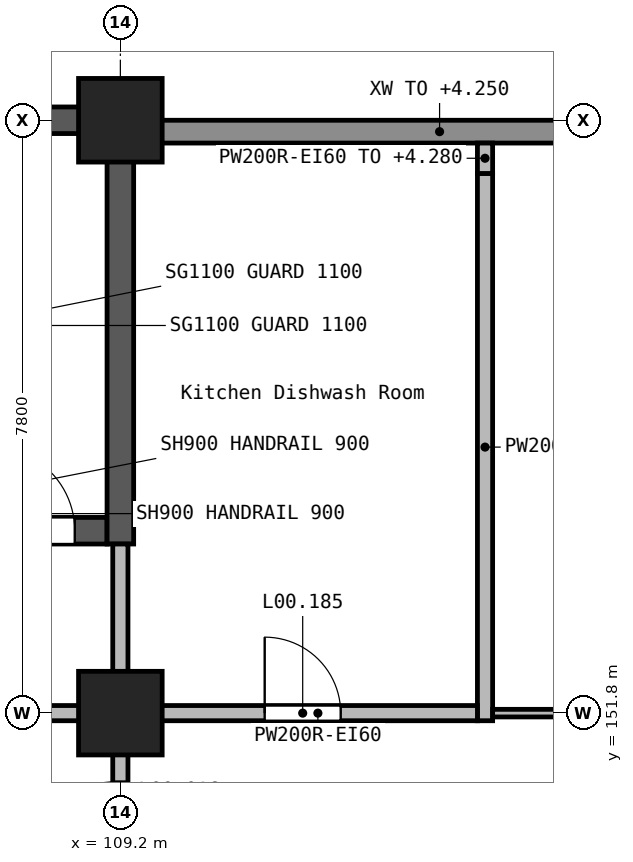
"""IFC4 building model, lengths in metres.
Left out: names, types, materials, properties, quantities, classifications, styles, units other than length and angle.
Written with IfcOpenShell. Run it as: python <this file> out.ifc"""

import sys

from ifc_helpers import new_model, si_unit, direction, frame, frame_2d, origin, origin_2d, place, context, subcontext, project, spatial, rectangle, extrude, element, fill, save


model = new_model("IFC4")
c1 = context("Model", 3, precision=1e-05, world=origin(), true_north=direction((0.0, 1.0)))
c2 = subcontext(c1, "Body", "Model", "MODEL_VIEW")
j1 = project(units=[si_unit("LENGTHUNIT", "METRE"), si_unit("PLANEANGLEUNIT", "RADIAN")], contexts=[c1])
p1 = place(None, origin())
s1 = spatial("IfcSite", under=j1, at=p1, CompositionType="ELEMENT")
p2 = place(p1, origin())
s2 = spatial("IfcBuilding", under=s1, at=p2, CompositionType="ELEMENT")
p3 = place(p2, origin())
s3 = spatial("IfcBuildingStorey", under=s2, at=p3, CompositionType="ELEMENT", Elevation=0.0)
for number, where, z_axis, x_axis in (
    (1, (109.2, 151.8, -0.3), (0.0, 0.0, 1.0), (1.0, 0.0, 0.0)),
    (2, (109.2, 159.6, -0.3), (0.0, 0.0, 1.0), (1.0, 0.0, 0.0)),
):
    element("IfcColumn", number, at=place(p3, frame(where, z_axis=z_axis, x_axis=x_axis)), inside=s3, PredefinedType="COLUMN", context=c2, shape_type="SweptSolid", body=[
        extrude(rectangle(XDim=1.1, YDim=1.1, at=origin_2d()), origin(), (0.0, 0.0, 1.0), 5.7),
    ])
p4 = place(p3, frame((100.625, 159.6, -0.3), z_axis=(0.0, 0.0, 1.0), x_axis=(1.0, 0.0, 0.0)))
e3 = element("IfcWall", 3, at=p4, inside=s3, PredefinedType="SHEAR", context=c2, shape_type="SweptSolid", body=[
    extrude(rectangle(XDim=8.4, YDim=0.35, at=frame_2d((4.2, 0.0))), origin(), (0.0, 0.0, 1.0), 5.7),
])
p5 = place(p4, frame((3.675, 0.0, 0.3)))
e4 = element("IfcOpeningElement", 4, at=p5, cuts=e3, PredefinedType="OPENING", context=c2, shape_type="SweptSolid", body=[
    extrude(rectangle(XDim=1.4, YDim=2.1, at=frame_2d((0.7, 1.05))), frame((0.0, 0.185, 0.0), z_axis=(0.0, -1.0, 0.0), x_axis=(1.0, 0.0, 0.0)), (0.0, 0.0, 1.0), 0.37),
])
p6 = place(p3, frame((100.975, 154.2, -0.3), z_axis=(0.0, 0.0, 1.0), x_axis=(1.0, 0.0, 0.0)))
e5 = element("IfcWall", 5, at=p6, inside=s3, PredefinedType="SHEAR", context=c2, shape_type="SweptSolid", body=[
    extrude(rectangle(XDim=8.05, YDim=0.35, at=frame_2d((4.025, 0.0))), origin(), (0.0, 0.0, 1.0), 5.7),
])
p7 = place(p6, frame((6.525, 0.0, 0.3)))
e6 = element("IfcOpeningElement", 6, at=p7, cuts=e5, PredefinedType="OPENING", context=c2, shape_type="SweptSolid", body=[
    extrude(rectangle(XDim=1.1, YDim=2.1, at=frame_2d((0.55, 1.05))), frame((0.0, 0.185, 0.0), z_axis=(0.0, -1.0, 0.0), x_axis=(1.0, 0.0, 0.0)), (0.0, 0.0, 1.0), 0.37),
])
p8 = place(p3, frame((109.2, 154.025, -0.3), z_axis=(0.0, 0.0, 1.0), x_axis=(0.0, 1.0, 0.0)))
e7 = element("IfcWall", 7, at=p8, inside=s3, PredefinedType="SHEAR", context=c2, shape_type="SweptSolid", body=[
    extrude(rectangle(XDim=5.75, YDim=0.35, at=frame_2d((2.875, 0.0))), origin(), (0.0, 0.0, 1.0), 5.7),
])
p9 = place(p3, frame((117.1, 159.45, 0.0), z_axis=(0.0, 0.0, 1.0), x_axis=(-1.0, 0.0, 0.0)))
e8 = element("IfcWall", 8, at=p9, inside=s3, PredefinedType="STANDARD", context=c2, shape_type="SweptSolid", body=[
    extrude(rectangle(XDim=7.4, YDim=0.3, at=frame_2d((3.7, 0.0))), origin(), (0.0, 0.0, 1.0), 4.25),
])
p10 = place(p3, frame((109.2, 148.7, 0.0), z_axis=(0.0, 0.0, 1.0), x_axis=(0.0, 1.0, 0.0)))
e9 = element("IfcWall", 9, at=p10, inside=s3, PredefinedType="SOLIDWALL", context=c2, shape_type="SweptSolid", body=[
    extrude(rectangle(XDim=2.6, YDim=0.2, at=frame_2d((1.3, 0.0))), origin(), (0.0, 0.0, 1.0), 5.05),
])
p11 = place(p10, frame((0.4, 0.0, 0.0)))
e10 = element("IfcOpeningElement", 10, at=p11, cuts=e9, PredefinedType="OPENING", context=c2, shape_type="SweptSolid", body=[
    extrude(rectangle(XDim=1.8, YDim=2.1, at=frame_2d((0.9, 1.05))), frame((0.0, 0.11, 0.0), z_axis=(0.0, -1.0, 0.0), x_axis=(1.0, 0.0, 0.0)), (0.0, 0.0, 1.0), 0.22),
])
p12 = place(p3, frame((109.2, 152.3, 0.0), z_axis=(0.0, 0.0, 1.0), x_axis=(0.0, 1.0, 0.0)))
e11 = element("IfcWall", 11, at=p12, inside=s3, PredefinedType="SOLIDWALL", context=c2, shape_type="SweptSolid", body=[
    extrude(rectangle(XDim=1.725, YDim=0.2, at=frame_2d((0.862, 0.0))), origin(), (0.0, 0.0, 1.0), 5.05),
])
p13 = place(p3, frame((101.3, 151.8, 0.0), z_axis=(0.0, 0.0, 1.0), x_axis=(1.0, 0.0, 0.0)))
e12 = element("IfcWall", 12, at=p13, inside=s3, PredefinedType="SOLIDWALL", context=c2, shape_type="SweptSolid", body=[
    extrude(rectangle(XDim=7.4, YDim=0.2, at=frame_2d((3.7, 0.0))), origin(), (0.0, 0.0, 1.0), 5.05),
])
p14 = place(p13, frame((3.15, 0.0, 0.0)))
e13 = element("IfcOpeningElement", 13, at=p14, cuts=e12, PredefinedType="OPENING", context=c2, shape_type="SweptSolid", body=[
    extrude(rectangle(XDim=1.1, YDim=2.1, at=frame_2d((0.55, 1.05))), frame((0.0, 0.11, 0.0), z_axis=(0.0, -1.0, 0.0), x_axis=(1.0, 0.0, 0.0)), (0.0, 0.0, 1.0), 0.22),
])
p15 = place(p3, frame((113.998, 151.7, 0.0), z_axis=(0.0, 0.0, 1.0), x_axis=(0.0, 1.0, 0.0)))
e14 = element("IfcWall", 14, at=p15, inside=s3, PredefinedType="SOLIDWALL", context=c2, shape_type="SweptSolid", body=[
    extrude(rectangle(XDim=7.2, YDim=0.2, at=frame_2d((3.6, 0.0))), origin(), (0.0, 0.0, 1.0), 5.05),
])
p16 = place(p3, frame((113.998, 158.9, 0.0), z_axis=(0.0, 0.0, 1.0), x_axis=(0.0, 1.0, 0.0)))
e15 = element("IfcWall", 15, at=p16, inside=s3, PredefinedType="SOLIDWALL", context=c2, shape_type="SweptSolid", body=[
    extrude(rectangle(XDim=0.4, YDim=0.2, at=frame_2d((0.2, 0.0))), origin(), (0.0, 0.0, 1.0), 4.28),
])
p17 = place(p3, frame((109.7, 151.8, 0.0), z_axis=(0.0, 0.0, 1.0), x_axis=(1.0, 0.0, 0.0)))
e16 = element("IfcWall", 16, at=p17, inside=s3, PredefinedType="SOLIDWALL", context=c2, shape_type="SweptSolid", body=[
    extrude(rectangle(XDim=4.198, YDim=0.2, at=frame_2d((2.099, 0.0))), origin(), (0.0, 0.0, 1.0), 5.05),
])
p18 = place(p17, frame((1.399, 0.0, 0.0)))
e17 = element("IfcOpeningElement", 17, at=p18, cuts=e16, PredefinedType="OPENING", context=c2, shape_type="SweptSolid", body=[
    extrude(rectangle(XDim=1.0, YDim=2.1, at=frame_2d((0.5, 1.05))), frame((0.0, 0.11, 0.0), z_axis=(0.0, -1.0, 0.0), x_axis=(1.0, 0.0, 0.0)), (0.0, 0.0, 1.0), 0.22),
])
p19 = place(p3, frame((117.1, 151.8, 0.0), z_axis=(0.0, 0.0, 1.0), x_axis=(-1.0, 0.0, 0.0)))
e18 = element("IfcWall", 18, at=p19, inside=s3, PredefinedType="PARTITIONING", context=c2, shape_type="SweptSolid", body=[
    extrude(rectangle(XDim=3.002, YDim=0.1, at=frame_2d((1.501, 0.0))), origin(), (0.0, 0.0, 1.0), 5.05),
])
p20 = place(p19, frame((0.852, 0.0, 0.0)))
e19 = element("IfcOpeningElement", 19, at=p20, cuts=e18, PredefinedType="OPENING", context=c2, shape_type="SweptSolid", body=[
    extrude(rectangle(XDim=0.9, YDim=2.1, at=frame_2d((0.45, 1.05))), frame((0.0, 0.06, 0.0), z_axis=(0.0, -1.0, 0.0), x_axis=(1.0, 0.0, 0.0)), (0.0, 0.0, 1.0), 0.12),
])
p21 = place(p7, origin())
e20 = element("IfcDoor", 20, at=p21, inside=s3, OperationType="SINGLE_SWING_RIGHT", PredefinedType="DOOR", context=c2, shape_type="SweptSolid", body=[
    extrude(rectangle(XDim=1.1, YDim=2.1, at=frame_2d((0.55, 1.05))), frame((0.0, 0.025, 0.0), z_axis=(0.0, -1.0, 0.0), x_axis=(1.0, 0.0, 0.0)), (0.0, 0.0, 1.0), 0.05),
])
fill(e6, e20)
p22 = place(p18, origin())
e21 = element("IfcDoor", 21, at=p22, inside=s3, OperationType="SINGLE_SWING_LEFT", PredefinedType="DOOR", context=c2, shape_type="SweptSolid", body=[
    extrude(rectangle(XDim=1.0, YDim=2.1, at=frame_2d((0.5, 1.05))), frame((0.0, 0.025, 0.0), z_axis=(0.0, -1.0, 0.0), x_axis=(1.0, 0.0, 0.0)), (0.0, 0.0, 1.0), 0.05),
])
fill(e17, e21)
save(model, sys.argv[1])
